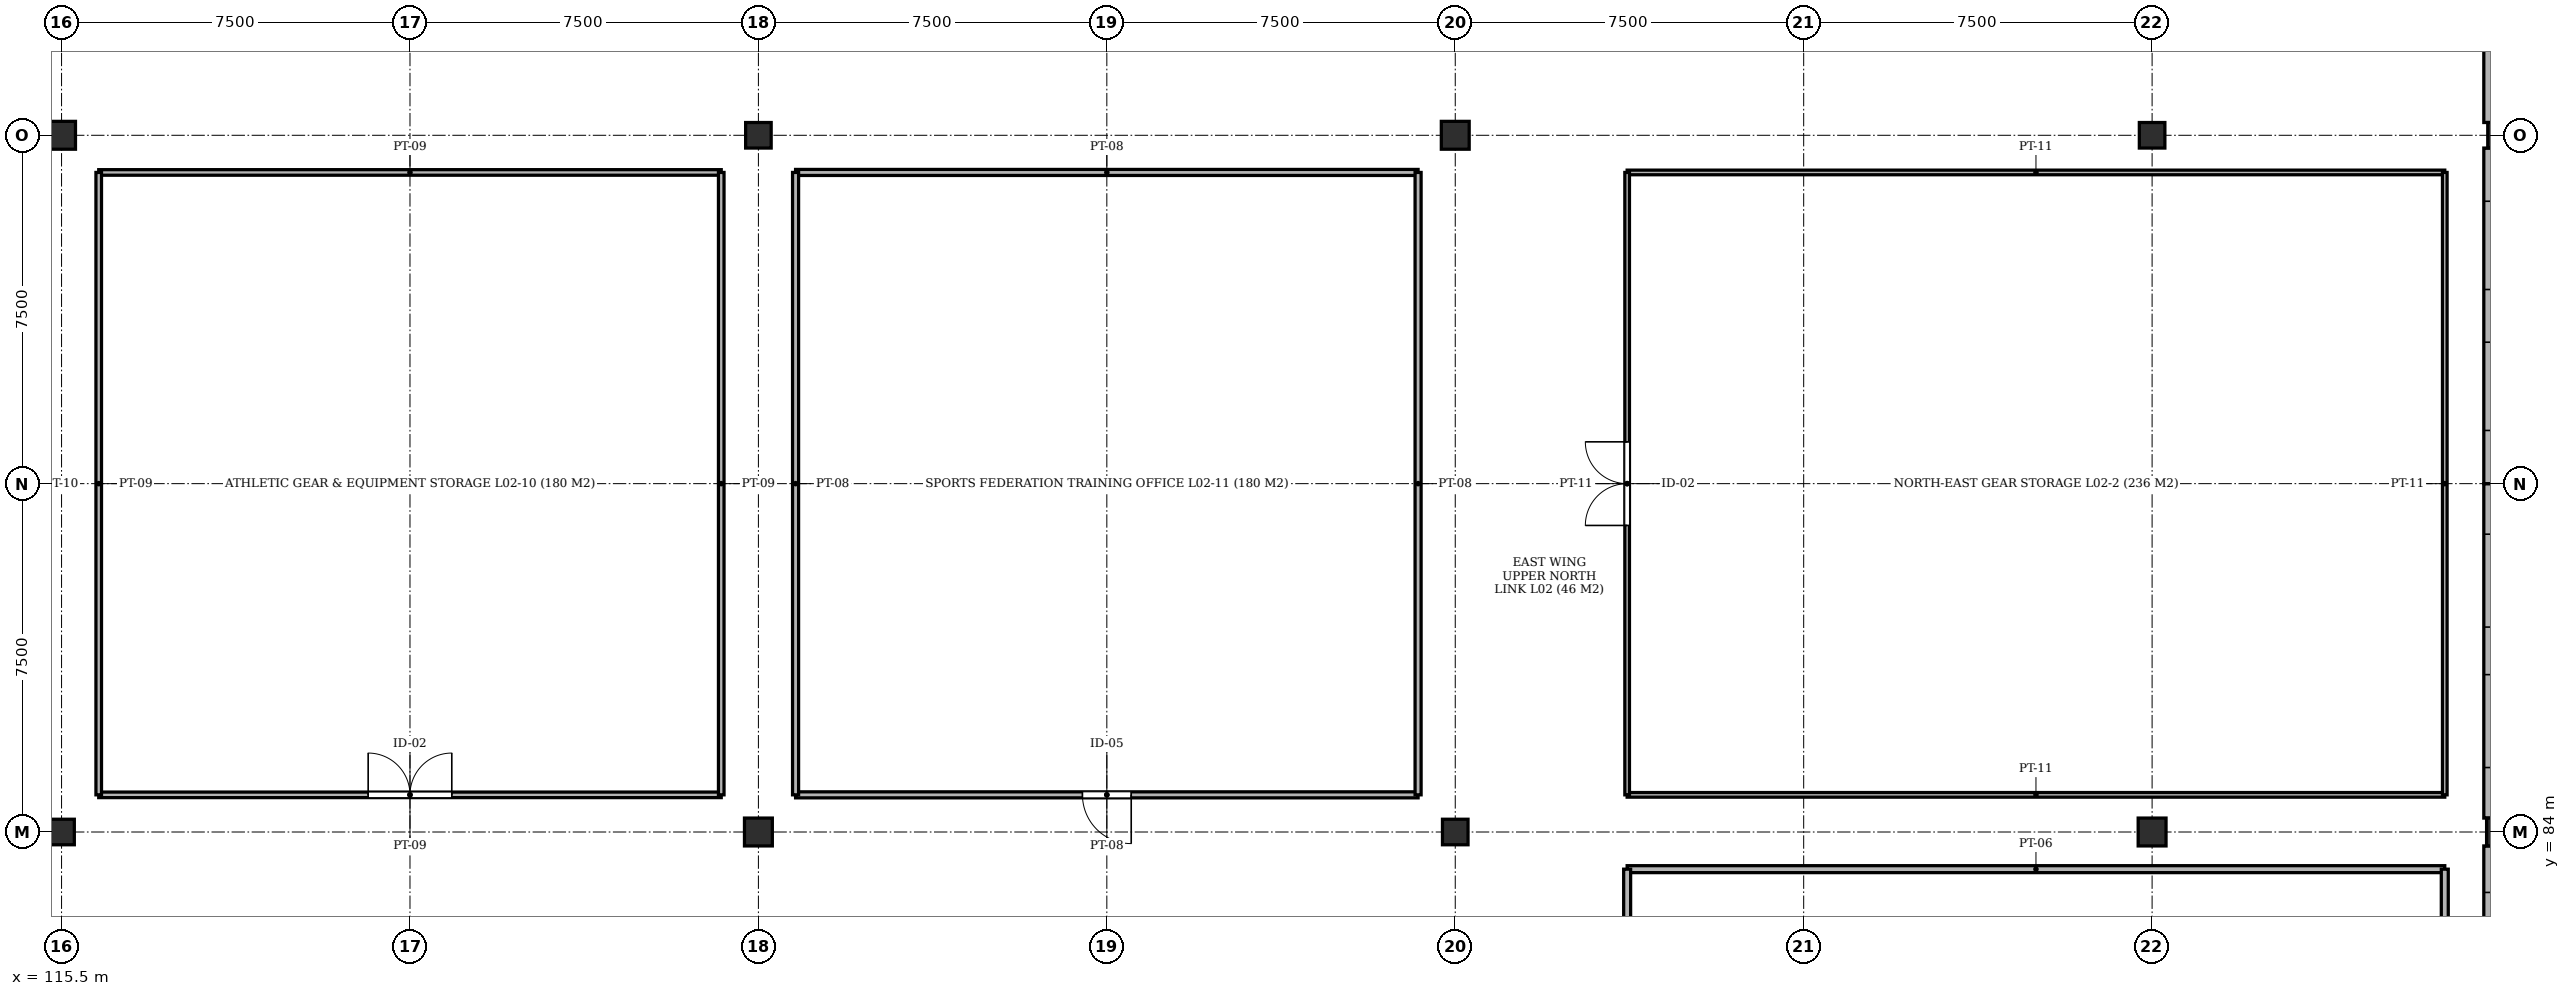
"""IFC4 building model, lengths in metres.
Left out: names, types, materials, properties, quantities, classifications, styles, units other than length and angle.
Written with IfcOpenShell. Run it as: python <this file> out.ifc"""

import sys

from ifc_helpers import new_model, si_unit, direction, frame, frame_2d, origin, origin_2d, place, context, subcontext, project, spatial, rectangle, extrude, element, fill, save


model = new_model("IFC4")
c1 = context("Model", 3, precision=1e-05, world=origin(), true_north=direction((0.0, 1.0)))
c2 = subcontext(c1, "Body", "Model", "MODEL_VIEW")
j1 = project(units=[si_unit("LENGTHUNIT", "METRE"), si_unit("PLANEANGLEUNIT", "RADIAN")], contexts=[c1])
p1 = place(None, origin())
s1 = spatial("IfcSite", under=j1, at=p1, CompositionType="ELEMENT")
p2 = place(p1, origin())
s2 = spatial("IfcBuilding", under=s1, at=p2, CompositionType="ELEMENT")
p3 = place(p2, frame((0.0, 0.0, 9.4)))
s3 = spatial("IfcBuildingStorey", under=s2, at=p3, CompositionType="ELEMENT", Elevation=9.4)
p4 = place(p3, frame((115.5, 84.0, -0.45), z_axis=(0.0, 0.0, 1.0), x_axis=(1.0, 0.0, 0.0)))
e1 = element("IfcColumn", 1, at=p4, inside=s3, PredefinedType="COLUMN", context=c2, shape_type="SweptSolid", body=[
    extrude(rectangle(XDim=0.55, YDim=0.55, at=origin_2d()), origin(), (0.0, 0.0, 1.0), 4.77),
])
for number, where, z_axis, x_axis in (
    (2, (115.5, 99.0, -0.45), (0.0, 0.0, 1.0), (1.0, 0.0, 0.0)),
    (3, (130.5, 84.0, -0.45), (0.0, 0.0, 1.0), (1.0, 0.0, 0.0)),
):
    element("IfcColumn", number, at=place(p3, frame(where, z_axis=z_axis, x_axis=x_axis)), inside=s3, PredefinedType="COLUMN", context=c2, shape_type="SweptSolid", body=[
        extrude(rectangle(XDim=0.6, YDim=0.6, at=origin_2d()), origin(), (0.0, 0.0, 1.0), 4.77),
    ])
for number, where, z_axis, x_axis in (
    (4, (130.5, 99.0, -0.45), (0.0, 0.0, 1.0), (1.0, 0.0, 0.0)),
    (5, (145.5, 84.0, -0.45), (0.0, 0.0, 1.0), (1.0, 0.0, 0.0)),
):
    element("IfcColumn", number, at=place(p3, frame(where, z_axis=z_axis, x_axis=x_axis)), inside=s3, PredefinedType="COLUMN", context=c2, shape_type="SweptSolid", body=[
        extrude(rectangle(XDim=0.55, YDim=0.55, at=origin_2d()), origin(), (0.0, 0.0, 1.0), 4.77),
    ])
for number, where, z_axis, x_axis in (
    (6, (145.5, 99.0, -0.45), (0.0, 0.0, 1.0), (1.0, 0.0, 0.0)),
    (7, (160.5, 84.0, -0.45), (0.0, 0.0, 1.0), (1.0, 0.0, 0.0)),
):
    element("IfcColumn", number, at=place(p3, frame(where, z_axis=z_axis, x_axis=x_axis)), inside=s3, PredefinedType="COLUMN", context=c2, shape_type="SweptSolid", body=[
        extrude(rectangle(XDim=0.6, YDim=0.6, at=origin_2d()), origin(), (0.0, 0.0, 1.0), 4.77),
    ])
p5 = place(p3, frame((160.5, 99.0, -0.45), z_axis=(0.0, 0.0, 1.0), x_axis=(1.0, 0.0, 0.0)))
e8 = element("IfcColumn", 8, at=p5, inside=s3, PredefinedType="COLUMN", context=c2, shape_type="SweptSolid", body=[
    extrude(rectangle(XDim=0.55, YDim=0.55, at=origin_2d()), origin(), (0.0, 0.0, 1.0), 4.77),
])
p6 = place(p3, frame((168.0, 84.0, -0.45), z_axis=(0.0, 0.0, 1.0), x_axis=(1.0, 0.0, 0.0)))
e9 = element("IfcColumn", 9, at=p6, inside=s3, PredefinedType="COLUMN", context=c2, shape_type="SweptSolid", body=[
    extrude(rectangle(XDim=0.6, YDim=0.6, at=origin_2d()), origin(), (0.0, 0.0, 1.0), 4.77),
])
p7 = place(p3, frame((168.0, 99.0, -0.45), z_axis=(0.0, 0.0, 1.0), x_axis=(1.0, 0.0, 0.0)))
e10 = element("IfcColumn", 10, at=p7, inside=s3, PredefinedType="COLUMN", context=c2, shape_type="SweptSolid", body=[
    extrude(rectangle(XDim=0.55, YDim=0.55, at=origin_2d()), origin(), (0.0, 0.0, 1.0), 4.77),
])
p8 = place(p3, frame((167.82, 76.8, 0.0), z_axis=(0.0, 0.0, 1.0), x_axis=(0.0, 1.0, 0.0)))
e11 = element("IfcWall", 11, at=p8, inside=s3, PredefinedType="SOLIDWALL", context=c2, shape_type="SweptSolid", body=[
    extrude(rectangle(XDim=6.9, YDim=0.36, at=frame_2d((3.45, 0.0))), origin(), (0.0, 0.0, 1.0), 3.45),
])
p9 = place(p8, frame((1.001, 0.0, 0.92)))
e12 = element("IfcOpeningElement", 12, at=p9, cuts=e11, PredefinedType="OPENING", context=c2, shape_type="SweptSolid", body=[
    extrude(rectangle(XDim=2.0, YDim=2.1, at=frame_2d((1.0, 1.05))), frame((0.0, 0.192, 0.0), z_axis=(0.0, -1.0, 0.0), x_axis=(1.0, 0.0, 0.0)), (0.0, 0.0, 1.0), 0.384),
])
p10 = place(p8, frame((3.899, 0.0, 0.92)))
e13 = element("IfcOpeningElement", 13, at=p10, cuts=e11, PredefinedType="OPENING", context=c2, shape_type="SweptSolid", body=[
    extrude(rectangle(XDim=2.0, YDim=2.1, at=frame_2d((1.0, 1.05))), frame((0.0, 0.192, 0.0), z_axis=(0.0, -1.0, 0.0), x_axis=(1.0, 0.0, 0.0)), (0.0, 0.0, 1.0), 0.384),
])
p11 = place(p3, frame((167.82, 84.3, 0.0), z_axis=(0.0, 0.0, 1.0), x_axis=(0.0, 1.0, 0.0)))
e14 = element("IfcWall", 14, at=p11, inside=s3, PredefinedType="SOLIDWALL", context=c2, shape_type="SweptSolid", body=[
    extrude(rectangle(XDim=7.2, YDim=0.36, at=frame_2d((3.6, 0.0))), origin(), (0.0, 0.0, 1.0), 3.45),
])
p12 = place(p11, frame((1.088, 0.0, 0.92)))
e15 = element("IfcOpeningElement", 15, at=p12, cuts=e14, PredefinedType="OPENING", context=c2, shape_type="SweptSolid", body=[
    extrude(rectangle(XDim=2.0, YDim=2.1, at=frame_2d((1.0, 1.05))), frame((0.0, 0.192, 0.0), z_axis=(0.0, -1.0, 0.0), x_axis=(1.0, 0.0, 0.0)), (0.0, 0.0, 1.0), 0.384),
])
p13 = place(p11, frame((4.112, 0.0, 0.92)))
e16 = element("IfcOpeningElement", 16, at=p13, cuts=e14, PredefinedType="OPENING", context=c2, shape_type="SweptSolid", body=[
    extrude(rectangle(XDim=2.0, YDim=2.1, at=frame_2d((1.0, 1.05))), frame((0.0, 0.192, 0.0), z_axis=(0.0, -1.0, 0.0), x_axis=(1.0, 0.0, 0.0)), (0.0, 0.0, 1.0), 0.384),
])
p14 = place(p3, frame((167.82, 91.5, 0.0), z_axis=(0.0, 0.0, 1.0), x_axis=(0.0, 1.0, 0.0)))
e17 = element("IfcWall", 17, at=p14, inside=s3, PredefinedType="SOLIDWALL", context=c2, shape_type="SweptSolid", body=[
    extrude(rectangle(XDim=7.225, YDim=0.36, at=frame_2d((3.613, 0.0))), origin(), (0.0, 0.0, 1.0), 3.45),
])
p15 = place(p14, frame((1.145, 0.0, 0.92)))
e18 = element("IfcOpeningElement", 18, at=p15, cuts=e17, PredefinedType="OPENING", context=c2, shape_type="SweptSolid", body=[
    extrude(rectangle(XDim=1.9, YDim=2.1, at=frame_2d((0.95, 1.05))), frame((0.0, 0.192, 0.0), z_axis=(0.0, -1.0, 0.0), x_axis=(1.0, 0.0, 0.0)), (0.0, 0.0, 1.0), 0.384),
])
p16 = place(p14, frame((4.18, 0.0, 0.92)))
e19 = element("IfcOpeningElement", 19, at=p16, cuts=e17, PredefinedType="OPENING", context=c2, shape_type="SweptSolid", body=[
    extrude(rectangle(XDim=1.9, YDim=2.1, at=frame_2d((0.95, 1.05))), frame((0.0, 0.192, 0.0), z_axis=(0.0, -1.0, 0.0), x_axis=(1.0, 0.0, 0.0)), (0.0, 0.0, 1.0), 0.384),
])
p17 = place(p3, frame((167.82, 99.275, 0.0), z_axis=(0.0, 0.0, 1.0), x_axis=(0.0, 1.0, 0.0)))
e20 = element("IfcWall", 20, at=p17, inside=s3, PredefinedType="SOLIDWALL", context=c2, shape_type="SweptSolid", body=[
    extrude(rectangle(XDim=7.225, YDim=0.36, at=frame_2d((3.613, 0.0))), origin(), (0.0, 0.0, 1.0), 3.45),
])
p18 = place(p17, frame((4.13, 0.0, 0.92)))
e21 = element("IfcOpeningElement", 21, at=p18, cuts=e20, PredefinedType="OPENING", context=c2, shape_type="SweptSolid", body=[
    extrude(rectangle(XDim=2.0, YDim=2.1, at=frame_2d((1.0, 1.05))), frame((0.0, 0.192, 0.0), z_axis=(0.0, -1.0, 0.0), x_axis=(1.0, 0.0, 0.0)), (0.0, 0.0, 1.0), 0.384),
])
p19 = place(p3, frame((116.3, 84.8, 0.0), z_axis=(0.0, 0.0, 1.0), x_axis=(1.0, 0.0, 0.0)))
e22 = element("IfcWall", 22, at=p19, inside=s3, PredefinedType="PARTITIONING", context=c2, shape_type="SweptSolid", body=[
    extrude(rectangle(XDim=13.4, YDim=0.12, at=frame_2d((6.7, 0.0))), origin(), (0.0, 0.0, 1.0), 3.88),
])
p20 = place(p19, frame((5.8, 0.0, 0.0)))
e23 = element("IfcOpeningElement", 23, at=p20, cuts=e22, PredefinedType="OPENING", context=c2, shape_type="SweptSolid", body=[
    extrude(rectangle(XDim=1.8, YDim=2.25, at=frame_2d((0.9, 1.125))), frame((0.0, 0.072, 0.0), z_axis=(0.0, -1.0, 0.0), x_axis=(1.0, 0.0, 0.0)), (0.0, 0.0, 1.0), 0.144),
])
for number, where, z_axis, x_axis in (
    (24, (116.3, 98.2, 0.0), (0.0, 0.0, 1.0), (1.0, 0.0, 0.0)),
    (25, (116.3, 84.8, 0.0), (0.0, 0.0, 1.0), (0.0, 1.0, 0.0)),
    (26, (129.7, 84.8, 0.0), (0.0, 0.0, 1.0), (0.0, 1.0, 0.0)),
):
    element("IfcWall", number, at=place(p3, frame(where, z_axis=z_axis, x_axis=x_axis)), inside=s3, PredefinedType="PARTITIONING", context=c2, shape_type="SweptSolid", body=[
        extrude(rectangle(XDim=13.4, YDim=0.12, at=frame_2d((6.7, 0.0))), origin(), (0.0, 0.0, 1.0), 3.88),
    ])
p21 = place(p3, frame((131.3, 84.8, 0.0), z_axis=(0.0, 0.0, 1.0), x_axis=(1.0, 0.0, 0.0)))
e27 = element("IfcWall", 27, at=p21, inside=s3, PredefinedType="PARTITIONING", context=c2, shape_type="SweptSolid", body=[
    extrude(rectangle(XDim=13.4, YDim=0.13, at=frame_2d((6.7, 0.0))), origin(), (0.0, 0.0, 1.0), 3.88),
])
p22 = place(p21, frame((6.175, 0.0, 0.0)))
e28 = element("IfcOpeningElement", 28, at=p22, cuts=e27, PredefinedType="OPENING", context=c2, shape_type="SweptSolid", body=[
    extrude(rectangle(XDim=1.05, YDim=2.15, at=frame_2d((0.525, 1.075))), frame((0.0, 0.077, 0.0), z_axis=(0.0, -1.0, 0.0), x_axis=(1.0, 0.0, 0.0)), (0.0, 0.0, 1.0), 0.154),
])
for number, where, z_axis, x_axis in (
    (29, (131.3, 98.2, 0.0), (0.0, 0.0, 1.0), (1.0, 0.0, 0.0)),
    (30, (131.3, 84.8, 0.0), (0.0, 0.0, 1.0), (0.0, 1.0, 0.0)),
    (31, (144.7, 84.8, 0.0), (0.0, 0.0, 1.0), (0.0, 1.0, 0.0)),
):
    element("IfcWall", number, at=place(p3, frame(where, z_axis=z_axis, x_axis=x_axis)), inside=s3, PredefinedType="PARTITIONING", context=c2, shape_type="SweptSolid", body=[
        extrude(rectangle(XDim=13.4, YDim=0.13, at=frame_2d((6.7, 0.0))), origin(), (0.0, 0.0, 1.0), 3.88),
    ])
p23 = place(p3, frame((149.2, 83.2, 0.0), z_axis=(0.0, 0.0, 1.0), x_axis=(1.0, 0.0, 0.0)))
e32 = element("IfcWall", 32, at=p23, inside=s3, PredefinedType="PARTITIONING", context=c2, shape_type="SweptSolid", body=[
    extrude(rectangle(XDim=17.6, YDim=0.15, at=frame_2d((8.8, 0.0))), origin(), (0.0, 0.0, 1.0), 3.88),
])
p24 = place(p3, frame((149.2, 70.4, 0.0), z_axis=(0.0, 0.0, 1.0), x_axis=(0.0, 1.0, 0.0)))
e33 = element("IfcWall", 33, at=p24, inside=s3, PredefinedType="PARTITIONING", context=c2, shape_type="SweptSolid", body=[
    extrude(rectangle(XDim=12.8, YDim=0.15, at=frame_2d((6.4, 0.0))), origin(), (0.0, 0.0, 1.0), 3.88),
])
p25 = place(p24, frame((5.5, 0.0, 0.0)))
e34 = element("IfcOpeningElement", 34, at=p25, cuts=e33, PredefinedType="OPENING", context=c2, shape_type="SweptSolid", body=[
    extrude(rectangle(XDim=1.8, YDim=2.25, at=frame_2d((0.9, 1.125))), frame((0.0, 0.087, 0.0), z_axis=(0.0, -1.0, 0.0), x_axis=(1.0, 0.0, 0.0)), (0.0, 0.0, 1.0), 0.174),
])
p26 = place(p3, frame((166.8, 70.4, 0.0), z_axis=(0.0, 0.0, 1.0), x_axis=(0.0, 1.0, 0.0)))
e35 = element("IfcWall", 35, at=p26, inside=s3, PredefinedType="PARTITIONING", context=c2, shape_type="SweptSolid", body=[
    extrude(rectangle(XDim=12.8, YDim=0.15, at=frame_2d((6.4, 0.0))), origin(), (0.0, 0.0, 1.0), 3.88),
])
for number, where, z_axis, x_axis in (
    (36, (149.2, 84.8, 0.0), (0.0, 0.0, 1.0), (1.0, 0.0, 0.0)),
    (37, (149.2, 98.2, 0.0), (0.0, 0.0, 1.0), (1.0, 0.0, 0.0)),
):
    element("IfcWall", number, at=place(p3, frame(where, z_axis=z_axis, x_axis=x_axis)), inside=s3, PredefinedType="PARTITIONING", context=c2, shape_type="SweptSolid", body=[
        extrude(rectangle(XDim=17.6, YDim=0.1, at=frame_2d((8.8, 0.0))), origin(), (0.0, 0.0, 1.0), 3.88),
    ])
p27 = place(p3, frame((149.2, 84.8, 0.0), z_axis=(0.0, 0.0, 1.0), x_axis=(0.0, 1.0, 0.0)))
e38 = element("IfcWall", 38, at=p27, inside=s3, PredefinedType="PARTITIONING", context=c2, shape_type="SweptSolid", body=[
    extrude(rectangle(XDim=13.4, YDim=0.1, at=frame_2d((6.7, 0.0))), origin(), (0.0, 0.0, 1.0), 3.88),
])
p28 = place(p27, frame((5.8, 0.0, 0.0)))
e39 = element("IfcOpeningElement", 39, at=p28, cuts=e38, PredefinedType="OPENING", context=c2, shape_type="SweptSolid", body=[
    extrude(rectangle(XDim=1.8, YDim=2.25, at=frame_2d((0.9, 1.125))), frame((0.0, 0.062, 0.0), z_axis=(0.0, -1.0, 0.0), x_axis=(1.0, 0.0, 0.0)), (0.0, 0.0, 1.0), 0.124),
])
p29 = place(p3, frame((166.8, 84.8, 0.0), z_axis=(0.0, 0.0, 1.0), x_axis=(0.0, 1.0, 0.0)))
e40 = element("IfcWall", 40, at=p29, inside=s3, PredefinedType="PARTITIONING", context=c2, shape_type="SweptSolid", body=[
    extrude(rectangle(XDim=13.4, YDim=0.1, at=frame_2d((6.7, 0.0))), origin(), (0.0, 0.0, 1.0), 3.88),
])
p30 = place(p10, origin())
e41 = element("IfcWindow", 41, at=p30, inside=s3, PartitioningType="SINGLE_PANEL", PredefinedType="WINDOW", context=c2, shape_type="SweptSolid", body=[
    extrude(rectangle(XDim=2.0, YDim=2.1, at=frame_2d((1.0, 1.05))), frame((0.0, 0.03, 0.0), z_axis=(0.0, -1.0, 0.0), x_axis=(1.0, 0.0, 0.0)), (0.0, 0.0, 1.0), 0.06),
])
fill(e13, e41)
p31 = place(p12, origin())
e42 = element("IfcWindow", 42, at=p31, inside=s3, PartitioningType="SINGLE_PANEL", PredefinedType="WINDOW", context=c2, shape_type="SweptSolid", body=[
    extrude(rectangle(XDim=2.0, YDim=2.1, at=frame_2d((1.0, 1.05))), frame((0.0, 0.03, 0.0), z_axis=(0.0, -1.0, 0.0), x_axis=(1.0, 0.0, 0.0)), (0.0, 0.0, 1.0), 0.06),
])
fill(e15, e42)
p32 = place(p13, origin())
e43 = element("IfcWindow", 43, at=p32, inside=s3, PartitioningType="SINGLE_PANEL", PredefinedType="WINDOW", context=c2, shape_type="SweptSolid", body=[
    extrude(rectangle(XDim=2.0, YDim=2.1, at=frame_2d((1.0, 1.05))), frame((0.0, 0.03, 0.0), z_axis=(0.0, -1.0, 0.0), x_axis=(1.0, 0.0, 0.0)), (0.0, 0.0, 1.0), 0.06),
])
fill(e16, e43)
p33 = place(p15, origin())
e44 = element("IfcWindow", 44, at=p33, inside=s3, PartitioningType="SINGLE_PANEL", PredefinedType="WINDOW", context=c2, shape_type="SweptSolid", body=[
    extrude(rectangle(XDim=1.9, YDim=2.1, at=frame_2d((0.95, 1.05))), frame((0.0, 0.03, 0.0), z_axis=(0.0, -1.0, 0.0), x_axis=(1.0, 0.0, 0.0)), (0.0, 0.0, 1.0), 0.06),
])
fill(e18, e44)
p34 = place(p16, origin())
e45 = element("IfcWindow", 45, at=p34, inside=s3, PartitioningType="SINGLE_PANEL", PredefinedType="WINDOW", context=c2, shape_type="SweptSolid", body=[
    extrude(rectangle(XDim=1.9, YDim=2.1, at=frame_2d((0.95, 1.05))), frame((0.0, 0.03, 0.0), z_axis=(0.0, -1.0, 0.0), x_axis=(1.0, 0.0, 0.0)), (0.0, 0.0, 1.0), 0.06),
])
fill(e19, e45)
p35 = place(p20, origin())
e46 = element("IfcDoor", 46, at=p35, inside=s3, OperationType="DOUBLE_DOOR_SINGLE_SWING", PredefinedType="DOOR", context=c2, shape_type="SweptSolid", body=[
    extrude(rectangle(XDim=1.8, YDim=2.25, at=frame_2d((0.9, 1.125))), frame((0.0, 0.025, 0.0), z_axis=(0.0, -1.0, 0.0), x_axis=(1.0, 0.0, 0.0)), (0.0, 0.0, 1.0), 0.05),
])
fill(e23, e46)
p36 = place(p22, frame((1.05, 0.0, 0.0), z_axis=(0.0, 0.0, 1.0), x_axis=(-1.0, 0.0, 0.0)))
e47 = element("IfcDoor", 47, at=p36, inside=s3, OperationType="SINGLE_SWING_RIGHT", PredefinedType="DOOR", context=c2, shape_type="SweptSolid", body=[
    extrude(rectangle(XDim=1.05, YDim=2.15, at=frame_2d((0.525, 1.075))), frame((0.0, 0.025, 0.0), z_axis=(0.0, -1.0, 0.0), x_axis=(1.0, 0.0, 0.0)), (0.0, 0.0, 1.0), 0.05),
])
fill(e28, e47)
p37 = place(p28, origin())
e48 = element("IfcDoor", 48, at=p37, inside=s3, OperationType="DOUBLE_DOOR_SINGLE_SWING", PredefinedType="DOOR", context=c2, shape_type="SweptSolid", body=[
    extrude(rectangle(XDim=1.8, YDim=2.25, at=frame_2d((0.9, 1.125))), frame((0.0, 0.025, 0.0), z_axis=(0.0, -1.0, 0.0), x_axis=(1.0, 0.0, 0.0)), (0.0, 0.0, 1.0), 0.05),
])
fill(e39, e48)
save(model, sys.argv[1])
